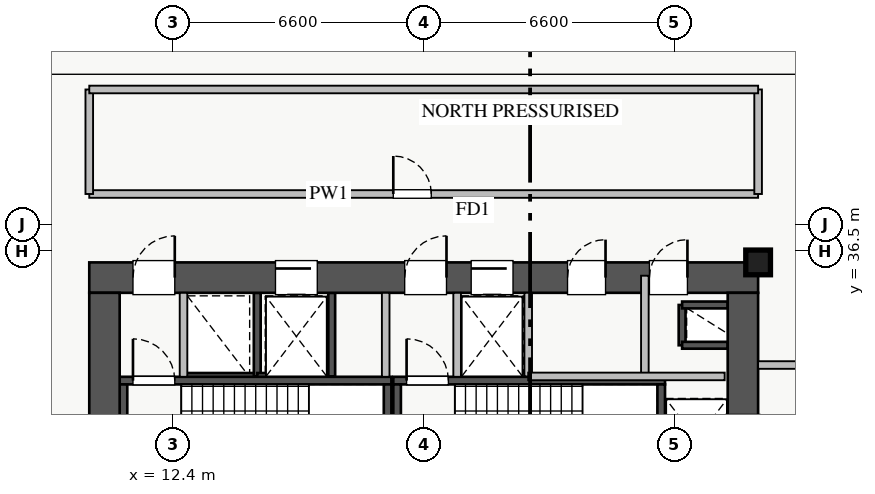
"""IFC4 building model, lengths in metres.
Left out: names, types, materials, properties, quantities, classifications, styles, units other than length and angle.
Written with IfcOpenShell. Run it as: python <this file> out.ifc"""

import sys

from ifc_helpers import new_model, si_unit, direction, frame, frame_2d, origin, origin_2d, place, context, subcontext, project, spatial, rectangle, extrude, source, transform, mapped, element, fill, save


model = new_model("IFC4")
c1 = context("Model", 3, precision=1e-05, world=origin(), true_north=direction((0.0, 1.0)))
c2 = subcontext(c1, "Body", "Model", "MODEL_VIEW")
j1 = project(units=[si_unit("LENGTHUNIT", "METRE"), si_unit("PLANEANGLEUNIT", "RADIAN")], contexts=[c1])
p1 = place(None, origin())
s1 = spatial("IfcSite", under=j1, at=p1, CompositionType="ELEMENT")
p2 = place(p1, origin())
s2 = spatial("IfcBuilding", under=s1, at=p2, CompositionType="ELEMENT")
p3 = place(p2, frame((0.0, 0.0, 45.75)))
s3 = spatial("IfcBuildingStorey", under=s2, at=p3, CompositionType="ELEMENT", Elevation=45.75)
p4 = place(p3, frame((12.68, 33.2, 0.0), z_axis=(0.0, 0.0, 1.0), x_axis=(1.0, 0.0, 0.0)))
e1 = element("IfcWall", 1, at=p4, inside=s3, PredefinedType="SHEAR", context=c2, shape_type="SweptSolid", body=[
    extrude(rectangle(XDim=1.94, YDim=0.18, at=frame_2d((0.97, 0.0))), origin(), (0.0, 0.0, 1.0), 4.32),
])
p5 = place(p3, frame((14.62, 33.2, 0.0), z_axis=(0.0, 0.0, 1.0), x_axis=(0.0, 1.0, 0.0)))
e2 = element("IfcWall", 2, at=p5, inside=s3, PredefinedType="SHEAR", context=c2, shape_type="SweptSolid", body=[
    extrude(rectangle(XDim=2.2, YDim=0.18, at=frame_2d((1.1, 0.0))), origin(), (0.0, 0.0, 1.0), 4.32),
])
p6 = place(p3, frame((25.8, 34.02, 0.0), z_axis=(0.0, 0.0, 1.0), x_axis=(0.0, 1.0, 0.0)))
e3 = element("IfcWall", 3, at=p6, inside=s3, PredefinedType="SHEAR", context=c2, shape_type="SweptSolid", body=[
    extrude(rectangle(XDim=1.06, YDim=0.18, at=frame_2d((0.53, 0.0))), origin(), (0.0, 0.0, 1.0), 4.32),
])
for number, where, z_axis, x_axis in (
    (4, (25.8, 35.08, 0.0), (0.0, 0.0, 1.0), (1.0, 0.0, 0.0)),
    (5, (25.8, 34.02, 0.0), (0.0, 0.0, 1.0), (1.0, 0.0, 0.0)),
):
    element("IfcWall", number, at=place(p3, frame(where, z_axis=z_axis, x_axis=x_axis)), inside=s3, PredefinedType="SHEAR", context=c2, shape_type="SweptSolid", body=[
        extrude(rectangle(XDim=1.2, YDim=0.18, at=frame_2d((0.6, 0.0))), origin(), (0.0, 0.0, 1.0), 4.32),
    ])
p7 = place(p3, frame((14.62, 33.2, 0.0), z_axis=(0.0, 0.0, 1.0), x_axis=(1.0, 0.0, 0.0)))
e6 = element("IfcWall", 6, at=p7, inside=s3, PredefinedType="SHEAR", context=c2, shape_type="SweptSolid", body=[
    extrude(rectangle(XDim=1.96, YDim=0.18, at=frame_2d((0.98, 0.0))), origin(), (0.0, 0.0, 1.0), 4.32),
])
p8 = place(p3, frame((16.58, 33.2, 0.0), z_axis=(0.0, 0.0, 1.0), x_axis=(0.0, 1.0, 0.0)))
e7 = element("IfcWall", 7, at=p8, inside=s3, PredefinedType="SHEAR", context=c2, shape_type="SweptSolid", body=[
    extrude(rectangle(XDim=2.2, YDim=0.18, at=frame_2d((1.1, 0.0))), origin(), (0.0, 0.0, 1.0), 4.32),
])
p9 = place(p3, frame((19.88, 33.2, 0.0), z_axis=(0.0, 0.0, 1.0), x_axis=(1.0, 0.0, 0.0)))
e8 = element("IfcWall", 8, at=p9, inside=s3, PredefinedType="SHEAR", context=c2, shape_type="SweptSolid", body=[
    extrude(rectangle(XDim=1.87, YDim=0.18, at=frame_2d((0.935, 0.0))), origin(), (0.0, 0.0, 1.0), 4.32),
])
p10 = place(p3, frame((11.0, 33.09, 0.0), z_axis=(0.0, 0.0, 1.0), x_axis=(1.0, 0.0, 0.0)))
e9 = element("IfcWall", 9, at=p10, inside=s3, PredefinedType="SHEAR", context=c2, shape_type="SweptSolid", body=[
    extrude(rectangle(XDim=7.15, YDim=0.2, at=frame_2d((3.575, 0.0))), origin(), (0.0, 0.0, 1.0), 4.5),
])
p11 = place(p10, frame((0.35, 0.0, 0.0)))
e10 = element("IfcOpeningElement", 10, at=p11, cuts=e9, PredefinedType="OPENING", context=c2, shape_type="SweptSolid", body=[
    extrude(rectangle(XDim=1.1, YDim=2.05, at=frame_2d((0.55, 1.025))), frame((0.0, 0.11, 0.0), z_axis=(0.0, -1.0, 0.0), x_axis=(1.0, 0.0, 0.0)), (0.0, 0.0, 1.0), 0.22),
])
for number, where, z_axis, x_axis in (
    (11, (11.1, 30.05, 0.0), (0.0, 0.0, 1.0), (0.0, 1.0, 0.0)),
    (12, (18.05, 30.05, 0.0), (0.0, 0.0, 1.0), (0.0, 1.0, 0.0)),
):
    element("IfcWall", number, at=place(p3, frame(where, z_axis=z_axis, x_axis=x_axis)), inside=s3, PredefinedType="SHEAR", context=c2, shape_type="SweptSolid", body=[
        extrude(rectangle(XDim=2.94, YDim=0.2, at=frame_2d((1.47, 0.0))), origin(), (0.0, 0.0, 1.0), 4.5),
    ])
p12 = place(p3, frame((18.2, 33.09, 0.0), z_axis=(0.0, 0.0, 1.0), x_axis=(1.0, 0.0, 0.0)))
e13 = element("IfcWall", 13, at=p12, inside=s3, PredefinedType="SHEAR", context=c2, shape_type="SweptSolid", body=[
    extrude(rectangle(XDim=7.15, YDim=0.2, at=frame_2d((3.575, 0.0))), origin(), (0.0, 0.0, 1.0), 4.5),
])
p13 = place(p12, frame((0.35, 0.0, 0.0)))
e14 = element("IfcOpeningElement", 14, at=p13, cuts=e13, PredefinedType="OPENING", context=c2, shape_type="SweptSolid", body=[
    extrude(rectangle(XDim=1.1, YDim=2.05, at=frame_2d((0.55, 1.025))), frame((0.0, 0.11, 0.0), z_axis=(0.0, -1.0, 0.0), x_axis=(1.0, 0.0, 0.0)), (0.0, 0.0, 1.0), 0.22),
])
for number, where, z_axis, x_axis in (
    (15, (18.3, 30.05, 0.0), (0.0, 0.0, 1.0), (0.0, 1.0, 0.0)),
    (16, (25.25, 30.05, 0.0), (0.0, 0.0, 1.0), (0.0, 1.0, 0.0)),
):
    element("IfcWall", number, at=place(p3, frame(where, z_axis=z_axis, x_axis=x_axis)), inside=s3, PredefinedType="SHEAR", context=c2, shape_type="SweptSolid", body=[
        extrude(rectangle(XDim=2.94, YDim=0.2, at=frame_2d((1.47, 0.0))), origin(), (0.0, 0.0, 1.0), 4.5),
    ])
p14 = place(p3, frame((10.2, 35.8, 0.0), z_axis=(0.0, 0.0, 1.0), x_axis=(1.0, 0.0, 0.0)))
e17 = element("IfcWall", 17, at=p14, inside=s3, PredefinedType="SHEAR", context=c2, shape_type="SweptSolid", body=[
    extrude(rectangle(XDim=17.6, YDim=0.8, at=frame_2d((8.8, 0.0))), origin(), (0.0, 0.0, 1.0), 4.5),
])
p15 = place(p14, frame((1.15, 0.0, 0.0)))
e18 = element("IfcOpeningElement", 18, at=p15, cuts=e17, PredefinedType="OPENING", context=c2, shape_type="SweptSolid", body=[
    extrude(rectangle(XDim=1.1, YDim=2.05, at=frame_2d((0.55, 1.025))), frame((0.0, 0.41, 0.0), z_axis=(0.0, -1.0, 0.0), x_axis=(1.0, 0.0, 0.0)), (0.0, 0.0, 1.0), 0.82),
])
p16 = place(p14, frame((8.3, 0.0, 0.0)))
e19 = element("IfcOpeningElement", 19, at=p16, cuts=e17, PredefinedType="OPENING", context=c2, shape_type="SweptSolid", body=[
    extrude(rectangle(XDim=1.1, YDim=2.05, at=frame_2d((0.55, 1.025))), frame((0.0, 0.41, 0.0), z_axis=(0.0, -1.0, 0.0), x_axis=(1.0, 0.0, 0.0)), (0.0, 0.0, 1.0), 0.82),
])
p17 = place(p14, frame((10.05, 0.0, 0.0)))
e20 = element("IfcOpeningElement", 20, at=p17, cuts=e17, PredefinedType="OPENING", context=c2, shape_type="SweptSolid", body=[
    extrude(rectangle(XDim=1.1, YDim=2.05, at=frame_2d((0.55, 1.025))), frame((0.0, 0.41, 0.0), z_axis=(0.0, -1.0, 0.0), x_axis=(1.0, 0.0, 0.0)), (0.0, 0.0, 1.0), 0.82),
])
p18 = place(p14, frame((4.9, 0.0, 0.0)))
e21 = element("IfcOpeningElement", 21, at=p18, cuts=e17, PredefinedType="OPENING", context=c2, shape_type="SweptSolid", body=[
    extrude(rectangle(XDim=1.1, YDim=2.05, at=frame_2d((0.55, 1.025))), frame((0.0, 0.41, 0.0), z_axis=(0.0, -1.0, 0.0), x_axis=(1.0, 0.0, 0.0)), (0.0, 0.0, 1.0), 0.82),
])
p19 = place(p14, frame((14.74, 0.0, 0.0)))
e22 = element("IfcOpeningElement", 22, at=p19, cuts=e17, PredefinedType="OPENING", context=c2, shape_type="SweptSolid", body=[
    extrude(rectangle(XDim=1.0, YDim=2.05, at=frame_2d((0.5, 1.025))), frame((0.0, 0.41, 0.0), z_axis=(0.0, -1.0, 0.0), x_axis=(1.0, 0.0, 0.0)), (0.0, 0.0, 1.0), 0.82),
])
p20 = place(p14, frame((12.585, 0.0, 0.0)))
e23 = element("IfcOpeningElement", 23, at=p20, cuts=e17, PredefinedType="OPENING", context=c2, shape_type="SweptSolid", body=[
    extrude(rectangle(XDim=1.0, YDim=2.05, at=frame_2d((0.5, 1.025))), frame((0.0, 0.41, 0.0), z_axis=(0.0, -1.0, 0.0), x_axis=(1.0, 0.0, 0.0)), (0.0, 0.0, 1.0), 0.82),
])
p21 = place(p3, frame((10.6, 29.8, 0.0), z_axis=(0.0, 0.0, 1.0), x_axis=(0.0, 1.0, 0.0)))
e24 = element("IfcWall", 24, at=p21, inside=s3, PredefinedType="SHEAR", context=c2, shape_type="SweptSolid", body=[
    extrude(rectangle(XDim=5.6, YDim=0.8, at=frame_2d((2.8, 0.0))), origin(), (0.0, 0.0, 1.0), 4.5),
])
p22 = place(p3, frame((27.4, 29.8, 0.0), z_axis=(0.0, 0.0, 1.0), x_axis=(0.0, 1.0, 0.0)))
e25 = element("IfcWall", 25, at=p22, inside=s3, PredefinedType="SHEAR", context=c2, shape_type="SweptSolid", body=[
    extrude(rectangle(XDim=5.6, YDim=0.8, at=frame_2d((2.8, 0.0))), origin(), (0.0, 0.0, 1.0), 4.5),
])
p23 = place(p22, frame((1.1, 0.0, 0.0)))
e26 = element("IfcOpeningElement", 26, at=p23, cuts=e25, PredefinedType="OPENING", context=c2, shape_type="SweptSolid", body=[
    extrude(rectangle(XDim=1.3, YDim=2.05, at=frame_2d((0.65, 1.025))), frame((0.0, 0.41, 0.0), z_axis=(0.0, -1.0, 0.0), x_axis=(1.0, 0.0, 0.0)), (0.0, 0.0, 1.0), 0.82),
])
m1 = source(origin(), c2, "Body", "SweptSolid", [
    extrude(rectangle(XDim=0.65, YDim=0.65, at=origin_2d()), origin(), (0.0, 0.0, 1.0), 4.5),
])
p24 = place(p3, frame((27.8, 36.2, 0.0), z_axis=(0.0, 0.0, 1.0), x_axis=(1.0, 0.0, 0.0)))
e27 = element("IfcColumn", 27, at=p24, inside=s3, PredefinedType="PILASTER", context=c2, shape_type="MappedRepresentation", body=[
    mapped(m1, transform((0.0, 0.0, 0.0), x_axis=(1.0, 0.0, 0.0), y_axis=(0.0, 1.0, 0.0), z_axis=(0.0, 0.0, 1.0), scale=1.0)),
])
p25 = place(p3, frame((27.8, 33.5, 0.0), z_axis=(0.0, 0.0, 1.0), x_axis=(1.0, 0.0, 0.0)))
e28 = element("IfcWall", 28, at=p25, inside=s3, PredefinedType="PARTITIONING", context=c2, shape_type="SweptSolid", body=[
    extrude(rectangle(XDim=3.1, YDim=0.2, at=frame_2d((1.55, 0.0))), origin(), (0.0, 0.0, 1.0), 3.315),
])
for number, where, z_axis, x_axis in (
    (29, (12.68, 33.19, 0.0), (0.0, 0.0, 1.0), (0.0, 1.0, 0.0)),
    (30, (18.0, 33.19, 0.0), (0.0, 0.0, 1.0), (0.0, 1.0, 0.0)),
    (31, (19.88, 33.19, 0.0), (0.0, 0.0, 1.0), (0.0, 1.0, 0.0)),
):
    element("IfcWall", number, at=place(p3, frame(where, z_axis=z_axis, x_axis=x_axis)), inside=s3, PredefinedType="PARTITIONING", context=c2, shape_type="SweptSolid", body=[
        extrude(rectangle(XDim=2.21, YDim=0.2, at=frame_2d((1.105, 0.0))), origin(), (0.0, 0.0, 1.0), 4.32),
    ])
p26 = place(p3, frame((24.82, 33.2, 0.0), z_axis=(0.0, 0.0, 1.0), x_axis=(0.0, 1.0, 0.0)))
e32 = element("IfcWall", 32, at=p26, inside=s3, PredefinedType="PARTITIONING", context=c2, shape_type="SweptSolid", body=[
    extrude(rectangle(XDim=2.65, YDim=0.2, at=frame_2d((1.325, 0.0))), origin(), (0.0, 0.0, 1.0), 4.32),
])
p27 = place(p3, frame((21.75, 33.2, 0.0), z_axis=(0.0, 0.0, 1.0), x_axis=(0.0, 1.0, 0.0)))
e33 = element("IfcWall", 33, at=p27, inside=s3, PredefinedType="PARTITIONING", context=c2, shape_type="SweptSolid", body=[
    extrude(rectangle(XDim=2.2, YDim=0.2, at=frame_2d((1.1, 0.0))), origin(), (0.0, 0.0, 1.0), 4.32),
])
p28 = place(p3, frame((21.75, 33.2, 0.0), z_axis=(0.0, 0.0, 1.0), x_axis=(1.0, 0.0, 0.0)))
e34 = element("IfcWall", 34, at=p28, inside=s3, PredefinedType="PARTITIONING", context=c2, shape_type="SweptSolid", body=[
    extrude(rectangle(XDim=5.17, YDim=0.2, at=frame_2d((2.585, 0.0))), origin(), (0.0, 0.0, 1.0), 4.32),
])
p29 = place(p3, frame((10.2, 38.0, 0.0), z_axis=(0.0, 0.0, 1.0), x_axis=(1.0, 0.0, 0.0)))
e35 = element("IfcWall", 35, at=p29, inside=s3, PredefinedType="PARTITIONING", context=c2, shape_type="SweptSolid", body=[
    extrude(rectangle(XDim=17.6, YDim=0.2, at=frame_2d((8.8, 0.0))), origin(), (0.0, 0.0, 1.0), 4.32),
])
p30 = place(p29, frame((8.0, 0.0, 0.0)))
e36 = element("IfcOpeningElement", 36, at=p30, cuts=e35, PredefinedType="OPENING", context=c2, shape_type="SweptSolid", body=[
    extrude(rectangle(XDim=1.0, YDim=2.05, at=frame_2d((0.5, 1.025))), frame((0.0, 0.11, 0.0), z_axis=(0.0, -1.0, 0.0), x_axis=(1.0, 0.0, 0.0)), (0.0, 0.0, 1.0), 0.22),
])
for number, where, z_axis, x_axis in (
    (37, (10.2, 38.0, 0.0), (0.0, 0.0, 1.0), (0.0, 1.0, 0.0)),
    (38, (27.8, 38.0, 0.0), (0.0, 0.0, 1.0), (0.0, 1.0, 0.0)),
):
    element("IfcWall", number, at=place(p3, frame(where, z_axis=z_axis, x_axis=x_axis)), inside=s3, PredefinedType="PARTITIONING", context=c2, shape_type="SweptSolid", body=[
        extrude(rectangle(XDim=2.75, YDim=0.2, at=frame_2d((1.375, 0.0))), origin(), (0.0, 0.0, 1.0), 4.32),
    ])
p31 = place(p3, frame((10.2, 40.75, 0.0), z_axis=(0.0, 0.0, 1.0), x_axis=(1.0, 0.0, 0.0)))
e39 = element("IfcWall", 39, at=p31, inside=s3, PredefinedType="PARTITIONING", context=c2, shape_type="SweptSolid", body=[
    extrude(rectangle(XDim=17.6, YDim=0.2, at=frame_2d((8.8, 0.0))), origin(), (0.0, 0.0, 1.0), 4.32),
])
m2 = source(origin(), c2, "Body", "SweptSolid", [
    extrude(rectangle(XDim=1.3, YDim=2.05, at=frame_2d((0.65, 1.025))), frame((0.0, 0.025, 0.0), z_axis=(0.0, -1.0, 0.0), x_axis=(1.0, 0.0, 0.0)), (0.0, 0.0, 1.0), 0.05),
])
p32 = place(p23, origin())
e40 = element("IfcDoor", 40, at=p32, inside=s3, OperationType="SLIDING_TO_LEFT", PredefinedType="DOOR", context=c2, shape_type="MappedRepresentation", body=[
    mapped(m2, transform((0.0, 0.0, 0.0), x_axis=(1.0, 0.0, 0.0), y_axis=(0.0, 1.0, 0.0), z_axis=(0.0, 0.0, 1.0), scale=1.0)),
])
fill(e26, e40)
m3 = source(origin(), c2, "Body", "SweptSolid", [
    extrude(rectangle(XDim=1.1, YDim=2.05, at=frame_2d((0.55, 1.025))), frame((0.0, 0.025, 0.0), z_axis=(0.0, -1.0, 0.0), x_axis=(1.0, 0.0, 0.0)), (0.0, 0.0, 1.0), 0.05),
])
p33 = place(p15, origin())
e41 = element("IfcDoor", 41, at=p33, inside=s3, OperationType="SINGLE_SWING_RIGHT", PredefinedType="DOOR", context=c2, shape_type="MappedRepresentation", body=[
    mapped(m3, transform((0.0, 0.0, 0.0), x_axis=(1.0, 0.0, 0.0), y_axis=(0.0, 1.0, 0.0), z_axis=(0.0, 0.0, 1.0), scale=1.0)),
])
fill(e18, e41)
p34 = place(p11, origin())
e42 = element("IfcDoor", 42, at=p34, inside=s3, OperationType="SINGLE_SWING_LEFT", PredefinedType="DOOR", context=c2, shape_type="MappedRepresentation", body=[
    mapped(m3, transform((0.0, 0.0, 0.0), x_axis=(1.0, 0.0, 0.0), y_axis=(0.0, 1.0, 0.0), z_axis=(0.0, 0.0, 1.0), scale=1.0)),
])
fill(e10, e42)
p35 = place(p16, origin())
e43 = element("IfcDoor", 43, at=p35, inside=s3, OperationType="SINGLE_SWING_RIGHT", PredefinedType="DOOR", context=c2, shape_type="MappedRepresentation", body=[
    mapped(m3, transform((0.0, 0.0, 0.0), x_axis=(1.0, 0.0, 0.0), y_axis=(0.0, 1.0, 0.0), z_axis=(0.0, 0.0, 1.0), scale=1.0)),
])
fill(e19, e43)
p36 = place(p13, origin())
e44 = element("IfcDoor", 44, at=p36, inside=s3, OperationType="SINGLE_SWING_LEFT", PredefinedType="DOOR", context=c2, shape_type="MappedRepresentation", body=[
    mapped(m3, transform((0.0, 0.0, 0.0), x_axis=(1.0, 0.0, 0.0), y_axis=(0.0, 1.0, 0.0), z_axis=(0.0, 0.0, 1.0), scale=1.0)),
])
fill(e14, e44)
p37 = place(p17, origin())
e45 = element("IfcDoor", 45, at=p37, inside=s3, OperationType="SLIDING_TO_LEFT", PredefinedType="DOOR", context=c2, shape_type="MappedRepresentation", body=[
    mapped(m3, transform((0.0, 0.0, 0.0), x_axis=(1.0, 0.0, 0.0), y_axis=(0.0, 1.0, 0.0), z_axis=(0.0, 0.0, 1.0), scale=1.0)),
])
fill(e20, e45)
p38 = place(p18, origin())
e46 = element("IfcDoor", 46, at=p38, inside=s3, OperationType="SLIDING_TO_LEFT", PredefinedType="DOOR", context=c2, shape_type="MappedRepresentation", body=[
    mapped(m3, transform((0.0, 0.0, 0.0), x_axis=(1.0, 0.0, 0.0), y_axis=(0.0, 1.0, 0.0), z_axis=(0.0, 0.0, 1.0), scale=1.0)),
])
fill(e21, e46)
m4 = source(origin(), c2, "Body", "SweptSolid", [
    extrude(rectangle(XDim=1.0, YDim=2.05, at=frame_2d((0.5, 1.025))), frame((0.0, 0.025, 0.0), z_axis=(0.0, -1.0, 0.0), x_axis=(1.0, 0.0, 0.0)), (0.0, 0.0, 1.0), 0.05),
])
p39 = place(p19, origin())
e47 = element("IfcDoor", 47, at=p39, inside=s3, OperationType="SINGLE_SWING_RIGHT", PredefinedType="DOOR", context=c2, shape_type="MappedRepresentation", body=[
    mapped(m4, transform((0.0, 0.0, 0.0), x_axis=(1.0, 0.0, 0.0), y_axis=(0.0, 1.0, 0.0), z_axis=(0.0, 0.0, 1.0), scale=1.0)),
])
fill(e22, e47)
p40 = place(p20, origin())
e48 = element("IfcDoor", 48, at=p40, inside=s3, OperationType="SINGLE_SWING_RIGHT", PredefinedType="DOOR", context=c2, shape_type="MappedRepresentation", body=[
    mapped(m4, transform((0.0, 0.0, 0.0), x_axis=(1.0, 0.0, 0.0), y_axis=(0.0, 1.0, 0.0), z_axis=(0.0, 0.0, 1.0), scale=1.0)),
])
fill(e23, e48)
p41 = place(p30, origin())
e49 = element("IfcDoor", 49, at=p41, inside=s3, OperationType="SINGLE_SWING_LEFT", PredefinedType="DOOR", context=c2, shape_type="MappedRepresentation", body=[
    mapped(m4, transform((0.0, 0.0, 0.0), x_axis=(1.0, 0.0, 0.0), y_axis=(0.0, 1.0, 0.0), z_axis=(0.0, 0.0, 1.0), scale=1.0)),
])
fill(e36, e49)
save(model, sys.argv[1])
